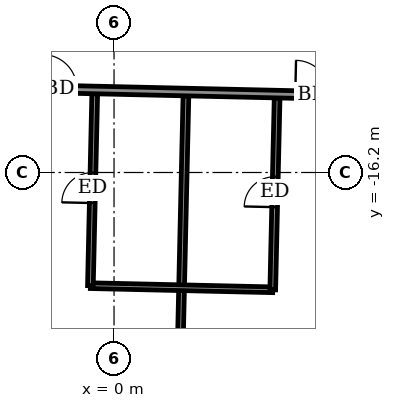
"""IFC4 building model, lengths in metres.
Left out: names, types, materials, properties, quantities, classifications, styles, units other than length and angle.
Written with IfcOpenShell. Run it as: python <this file> out.ifc"""

import sys

from ifc_helpers import new_model, si_unit, direction, frame, frame_2d, origin, place, context, subcontext, project, spatial, rectangle, extrude, element, fill, save


model = new_model("IFC4")
c1 = context("Model", 3, precision=1e-05, world=origin(), true_north=direction((0.0, 1.0)))
c2 = subcontext(c1, "Body", "Model", "MODEL_VIEW")
j1 = project(units=[si_unit("LENGTHUNIT", "METRE"), si_unit("PLANEANGLEUNIT", "RADIAN")], contexts=[c1])
p1 = place(None, origin())
s1 = spatial("IfcSite", under=j1, at=p1, CompositionType="ELEMENT")
p2 = place(p1, origin())
s2 = spatial("IfcBuilding", under=s1, at=p2, CompositionType="ELEMENT")
p3 = place(p2, frame((0.0, 0.0, 306.1)))
s3 = spatial("IfcBuildingStorey", under=s2, at=p3, CompositionType="ELEMENT", Elevation=306.1)
p4 = place(p3, frame((1.632, -25.63, 0.0), z_axis=(0.0, 0.0, 1.0), x_axis=(0.022708812003, 0.999742121678, 0.0)))
e1 = element("IfcWall", 1, at=p4, inside=s3, PredefinedType="PARTITIONING", context=c2, shape_type="SweptSolid", body=[
    extrude(rectangle(XDim=11.45, YDim=0.15, at=frame_2d((5.725, 0.0))), origin(), (0.0, 0.0, 1.0), 2.5),
])
p5 = place(p3, frame((-0.622, -19.178, 0.0), z_axis=(0.0, 0.0, 1.0), x_axis=(0.999747191239, -0.022484519337, 0.0)))
e2 = element("IfcWall", 2, at=p5, inside=s3, PredefinedType="PARTITIONING", context=c2, shape_type="SweptSolid", body=[
    extrude(rectangle(XDim=4.799, YDim=0.15, at=frame_2d((2.4, 0.0))), origin(), (0.0, 0.0, 1.0), 3.05),
])
p6 = place(p3, frame((-0.622, -19.178, 0.0), z_axis=(0.0, 0.0, 1.0), x_axis=(0.02257535817, 0.999745144126, 0.0)))
e3 = element("IfcWall", 3, at=p6, inside=s3, PredefinedType="PARTITIONING", context=c2, shape_type="SweptSolid", body=[
    extrude(rectangle(XDim=5.05, YDim=0.15, at=frame_2d((2.525, 0.0))), origin(), (0.0, 0.0, 1.0), 3.05),
])
p7 = place(p6, frame((2.175, 0.0, 0.0)))
e4 = element("IfcOpeningElement", 4, at=p7, cuts=e3, PredefinedType="OPENING", context=c2, shape_type="SweptSolid", body=[
    extrude(rectangle(XDim=0.8, YDim=2.1, at=frame_2d((0.4, 1.05))), frame((0.0, 0.085, 0.0), z_axis=(0.0, -1.0, 0.0), x_axis=(1.0, 0.0, 0.0)), (0.0, 0.0, 1.0), 0.17),
])
p8 = place(p3, frame((4.176, -19.286, 0.0), z_axis=(0.0, 0.0, 1.0), x_axis=(0.022774126501, 0.999740635946, 0.0)))
e5 = element("IfcWall", 5, at=p8, inside=s3, PredefinedType="PARTITIONING", context=c2, shape_type="SweptSolid", body=[
    extrude(rectangle(XDim=5.049, YDim=0.15, at=frame_2d((2.524, 0.0))), origin(), (0.0, 0.0, 1.0), 3.05),
])
p9 = place(p8, frame((2.175, 0.0, 0.0)))
e6 = element("IfcOpeningElement", 6, at=p9, cuts=e5, PredefinedType="OPENING", context=c2, shape_type="SweptSolid", body=[
    extrude(rectangle(XDim=0.8, YDim=2.1, at=frame_2d((0.4, 1.05))), frame((0.0, 0.085, 0.0), z_axis=(0.0, -1.0, 0.0), x_axis=(1.0, 0.0, 0.0)), (0.0, 0.0, 1.0), 0.17),
])
p10 = place(p3, frame((-31.347, -13.329, 0.0), z_axis=(0.0, 0.0, 1.0), x_axis=(0.999742613079, -0.022687168058, 0.0)))
e7 = element("IfcWall", 7, at=p10, inside=s3, PredefinedType="PARTITIONING", context=c2, shape_type="SweptSolid", body=[
    extrude(rectangle(XDim=58.799, YDim=0.2, at=frame_2d((29.399, 0.0))), origin(), (0.0, 0.0, 1.0), 3.05),
])
p11 = place(p10, frame((1.35, 0.0, 0.0)))
e8 = element("IfcOpeningElement", 8, at=p11, cuts=e7, PredefinedType="OPENING", context=c2, shape_type="SweptSolid", body=[
    extrude(rectangle(XDim=1.0, YDim=2.1, at=frame_2d((0.5, 1.05))), frame((0.0, 0.11, 0.0), z_axis=(0.0, -1.0, 0.0), x_axis=(1.0, 0.0, 0.0)), (0.0, 0.0, 1.0), 0.22),
])
p12 = place(p10, frame((5.95, 0.0, 0.0)))
e9 = element("IfcOpeningElement", 9, at=p12, cuts=e7, PredefinedType="OPENING", context=c2, shape_type="SweptSolid", body=[
    extrude(rectangle(XDim=0.9, YDim=2.1, at=frame_2d((0.45, 1.05))), frame((0.0, 0.11, 0.0), z_axis=(0.0, -1.0, 0.0), x_axis=(1.0, 0.0, 0.0)), (0.0, 0.0, 1.0), 0.22),
])
p13 = place(p10, frame((10.575, 0.0, 0.0)))
e10 = element("IfcOpeningElement", 10, at=p13, cuts=e7, PredefinedType="OPENING", context=c2, shape_type="SweptSolid", body=[
    extrude(rectangle(XDim=0.9, YDim=2.1, at=frame_2d((0.45, 1.05))), frame((0.0, 0.11, 0.0), z_axis=(0.0, -1.0, 0.0), x_axis=(1.0, 0.0, 0.0)), (0.0, 0.0, 1.0), 0.22),
])
p14 = place(p10, frame((12.425, 0.0, 0.0)))
e11 = element("IfcOpeningElement", 11, at=p14, cuts=e7, PredefinedType="OPENING", context=c2, shape_type="SweptSolid", body=[
    extrude(rectangle(XDim=0.9, YDim=2.1, at=frame_2d((0.45, 1.05))), frame((0.0, 0.11, 0.0), z_axis=(0.0, -1.0, 0.0), x_axis=(1.0, 0.0, 0.0)), (0.0, 0.0, 1.0), 0.22),
])
p15 = place(p10, frame((19.075, 0.0, 0.0)))
e12 = element("IfcOpeningElement", 12, at=p15, cuts=e7, PredefinedType="OPENING", context=c2, shape_type="SweptSolid", body=[
    extrude(rectangle(XDim=0.9, YDim=2.1, at=frame_2d((0.45, 1.05))), frame((0.0, 0.11, 0.0), z_axis=(0.0, -1.0, 0.0), x_axis=(1.0, 0.0, 0.0)), (0.0, 0.0, 1.0), 0.22),
])
p16 = place(p10, frame((20.95, 0.0, 0.0)))
e13 = element("IfcOpeningElement", 13, at=p16, cuts=e7, PredefinedType="OPENING", context=c2, shape_type="SweptSolid", body=[
    extrude(rectangle(XDim=0.9, YDim=2.1, at=frame_2d((0.45, 1.05))), frame((0.0, 0.11, 0.0), z_axis=(0.0, -1.0, 0.0), x_axis=(1.0, 0.0, 0.0)), (0.0, 0.0, 1.0), 0.22),
])
p17 = place(p10, frame((27.625, 0.0, 0.0)))
e14 = element("IfcOpeningElement", 14, at=p17, cuts=e7, PredefinedType="OPENING", context=c2, shape_type="SweptSolid", body=[
    extrude(rectangle(XDim=0.9, YDim=2.1, at=frame_2d((0.45, 1.05))), frame((0.0, 0.11, 0.0), z_axis=(0.0, -1.0, 0.0), x_axis=(1.0, 0.0, 0.0)), (0.0, 0.0, 1.0), 0.22),
])
p18 = place(p10, frame((29.475, 0.0, 0.0)))
e15 = element("IfcOpeningElement", 15, at=p18, cuts=e7, PredefinedType="OPENING", context=c2, shape_type="SweptSolid", body=[
    extrude(rectangle(XDim=0.9, YDim=2.1, at=frame_2d((0.45, 1.05))), frame((0.0, 0.11, 0.0), z_axis=(0.0, -1.0, 0.0), x_axis=(1.0, 0.0, 0.0)), (0.0, 0.0, 1.0), 0.22),
])
p19 = place(p10, frame((36.125, 0.0, 0.0)))
e16 = element("IfcOpeningElement", 16, at=p19, cuts=e7, PredefinedType="OPENING", context=c2, shape_type="SweptSolid", body=[
    extrude(rectangle(XDim=0.9, YDim=2.1, at=frame_2d((0.45, 1.05))), frame((0.0, 0.11, 0.0), z_axis=(0.0, -1.0, 0.0), x_axis=(1.0, 0.0, 0.0)), (0.0, 0.0, 1.0), 0.22),
])
p20 = place(p10, frame((37.95, 0.0, 0.0)))
e17 = element("IfcOpeningElement", 17, at=p20, cuts=e7, PredefinedType="OPENING", context=c2, shape_type="SweptSolid", body=[
    extrude(rectangle(XDim=0.9, YDim=2.1, at=frame_2d((0.45, 1.05))), frame((0.0, 0.11, 0.0), z_axis=(0.0, -1.0, 0.0), x_axis=(1.0, 0.0, 0.0)), (0.0, 0.0, 1.0), 0.22),
])
p21 = place(p10, frame((44.6, 0.0, 0.0)))
e18 = element("IfcOpeningElement", 18, at=p21, cuts=e7, PredefinedType="OPENING", context=c2, shape_type="SweptSolid", body=[
    extrude(rectangle(XDim=0.9, YDim=2.1, at=frame_2d((0.45, 1.05))), frame((0.0, 0.11, 0.0), z_axis=(0.0, -1.0, 0.0), x_axis=(1.0, 0.0, 0.0)), (0.0, 0.0, 1.0), 0.22),
])
p22 = place(p10, frame((46.475, 0.0, 0.0)))
e19 = element("IfcOpeningElement", 19, at=p22, cuts=e7, PredefinedType="OPENING", context=c2, shape_type="SweptSolid", body=[
    extrude(rectangle(XDim=0.9, YDim=2.1, at=frame_2d((0.45, 1.05))), frame((0.0, 0.11, 0.0), z_axis=(0.0, -1.0, 0.0), x_axis=(1.0, 0.0, 0.0)), (0.0, 0.0, 1.0), 0.22),
])
p23 = place(p10, frame((55.925, 0.0, 0.0)))
e20 = element("IfcOpeningElement", 20, at=p23, cuts=e7, PredefinedType="OPENING", context=c2, shape_type="SweptSolid", body=[
    extrude(rectangle(XDim=1.0, YDim=2.1, at=frame_2d((0.5, 1.05))), frame((0.0, 0.11, 0.0), z_axis=(0.0, -1.0, 0.0), x_axis=(1.0, 0.0, 0.0)), (0.0, 0.0, 1.0), 0.22),
])
p24 = place(p10, frame((51.0, 0.0, 0.0)))
e21 = element("IfcOpeningElement", 21, at=p24, cuts=e7, PredefinedType="OPENING", context=c2, shape_type="SweptSolid", body=[
    extrude(rectangle(XDim=0.9, YDim=2.1, at=frame_2d((0.45, 1.05))), frame((0.0, 0.11, 0.0), z_axis=(0.0, -1.0, 0.0), x_axis=(1.0, 0.0, 0.0)), (0.0, 0.0, 1.0), 0.22),
])
p25 = place(p18, origin())
e22 = element("IfcDoor", 22, at=p25, inside=s3, OperationType="SINGLE_SWING_RIGHT", PredefinedType="DOOR", context=c2, shape_type="SweptSolid", body=[
    extrude(rectangle(XDim=0.9, YDim=2.1, at=frame_2d((0.45, 1.05))), frame((0.0, 0.025, 0.0), z_axis=(0.0, -1.0, 0.0), x_axis=(1.0, 0.0, 0.0)), (0.0, 0.0, 1.0), 0.05),
])
fill(e15, e22)
p26 = place(p7, origin())
e23 = element("IfcDoor", 23, at=p26, inside=s3, OperationType="SINGLE_SWING_RIGHT", PredefinedType="DOOR", context=c2, shape_type="SweptSolid", body=[
    extrude(rectangle(XDim=0.8, YDim=2.1, at=frame_2d((0.4, 1.05))), frame((0.0, 0.025, 0.0), z_axis=(0.0, -1.0, 0.0), x_axis=(1.0, 0.0, 0.0)), (0.0, 0.0, 1.0), 0.05),
])
fill(e4, e23)
p27 = place(p19, origin())
e24 = element("IfcDoor", 24, at=p27, inside=s3, OperationType="SINGLE_SWING_LEFT", PredefinedType="DOOR", context=c2, shape_type="SweptSolid", body=[
    extrude(rectangle(XDim=0.9, YDim=2.1, at=frame_2d((0.45, 1.05))), frame((0.0, 0.025, 0.0), z_axis=(0.0, -1.0, 0.0), x_axis=(1.0, 0.0, 0.0)), (0.0, 0.0, 1.0), 0.05),
])
fill(e16, e24)
p28 = place(p9, origin())
e25 = element("IfcDoor", 25, at=p28, inside=s3, OperationType="SINGLE_SWING_LEFT", PredefinedType="DOOR", context=c2, shape_type="SweptSolid", body=[
    extrude(rectangle(XDim=0.8, YDim=2.1, at=frame_2d((0.4, 1.05))), frame((0.0, 0.025, 0.0), z_axis=(0.0, -1.0, 0.0), x_axis=(1.0, 0.0, 0.0)), (0.0, 0.0, 1.0), 0.05),
])
fill(e6, e25)
save(model, sys.argv[1])
